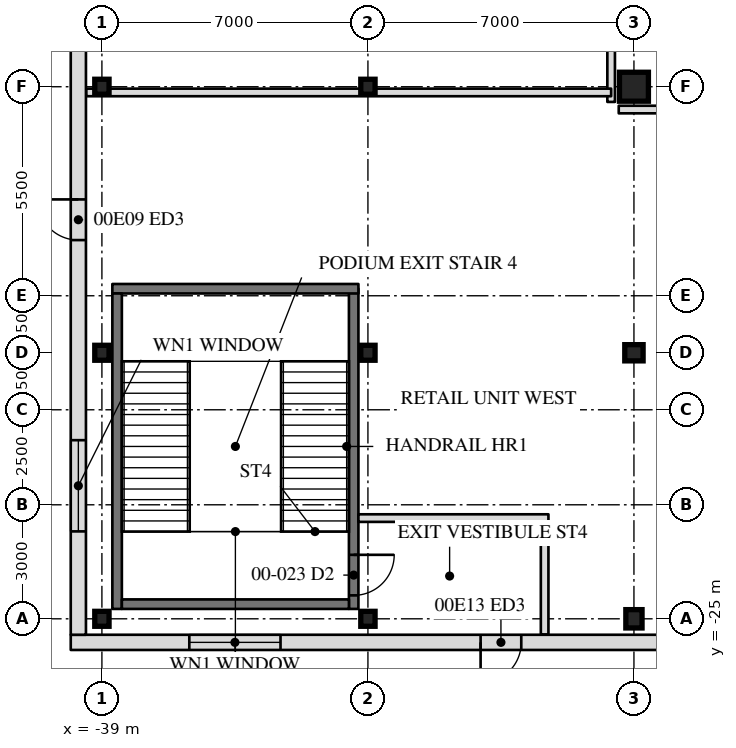
"""IFC4 building model, lengths in metres.
Left out: names, types, materials, properties, quantities, classifications, styles, units other than length and angle.
Written with IfcOpenShell. Run it as: python <this file> out.ifc"""

import sys

from ifc_helpers import new_model, si_unit, direction, frame, frame_2d, origin, origin_2d, place, context, subcontext, project, spatial, rectangle, hollow_rectangle, i_section, extrude, element, fill, save


model = new_model("IFC4")
c1 = context("Model", 3, precision=1e-05, world=origin(), true_north=direction((0.0, 1.0)))
c2 = subcontext(c1, "Body", "Model", "MODEL_VIEW")
j1 = project(units=[si_unit("LENGTHUNIT", "METRE"), si_unit("PLANEANGLEUNIT", "RADIAN")], contexts=[c1])
p1 = place(None, origin())
s1 = spatial("IfcSite", under=j1, at=p1, CompositionType="ELEMENT")
p2 = place(p1, origin())
s2 = spatial("IfcBuilding", under=s1, at=p2, CompositionType="ELEMENT")
p3 = place(p2, origin())
s3 = spatial("IfcBuildingStorey", under=s2, at=p3, CompositionType="ELEMENT", Elevation=0.0)
p4 = place(p3, frame((-25.0, -11.0, -0.3), z_axis=(0.0, 0.0, 1.0), x_axis=(0.0, 1.0, 0.0)))
e1 = element("IfcColumn", 1, at=p4, inside=s3, PredefinedType="COLUMN", context=c2, shape_type="SweptSolid", body=[
    extrude(hollow_rectangle(XDim=0.762, YDim=0.762, WallThickness=0.152, at=origin_2d()), origin(), (0.0, 0.0, 1.0), 6.3),
])
for number, where, z_axis, x_axis in (
    (2, (-25.0, -18.0, -0.3), (0.0, 0.0, 1.0), (0.0, 1.0, 0.0)),
    (3, (-25.0, -25.0, -0.3), (0.0, 0.0, 1.0), (1.0, 0.0, 0.0)),
):
    element("IfcColumn", number, at=place(p3, frame(where, z_axis=z_axis, x_axis=x_axis)), inside=s3, PredefinedType="COLUMN", context=c2, shape_type="SweptSolid", body=[
        extrude(i_section(OverallWidth=0.427, OverallDepth=0.483, WebThickness=0.051, FlangeThickness=0.082, at=origin_2d()), origin(), (0.0, 0.0, 1.0), 6.3),
    ])
for number, where, z_axis, x_axis in (
    (4, (-39.0, -25.0, -0.3), (0.0, 0.0, 1.0), (0.0, 1.0, 0.0)),
    (5, (-39.0, -18.0, -0.3), (0.0, 0.0, 1.0), (0.0, 1.0, 0.0)),
    (6, (-39.0, -11.0, -0.3), (0.0, 0.0, 1.0), (0.0, 1.0, 0.0)),
    (7, (-32.0, -25.0, -0.3), (0.0, 0.0, 1.0), (0.0, 1.0, 0.0)),
    (8, (-32.0, -18.0, -0.3), (0.0, 0.0, 1.0), (0.0, 1.0, 0.0)),
    (9, (-32.0, -11.0, -0.3), (0.0, 0.0, 1.0), (0.0, 1.0, 0.0)),
):
    element("IfcColumn", number, at=place(p3, frame(where, z_axis=z_axis, x_axis=x_axis)), inside=s3, PredefinedType="COLUMN", context=c2, shape_type="SweptSolid", body=[
        extrude(i_section(OverallWidth=0.394, OverallDepth=0.376, WebThickness=0.017, FlangeThickness=0.028, at=origin_2d()), origin(), (0.0, 0.0, 1.0), 6.3),
    ])
p5 = place(p3, frame((-39.82, -25.62, -0.3), z_axis=(0.0, 0.0, 1.0), x_axis=(1.0, 0.0, 0.0)))
e10 = element("IfcWall", 10, at=p5, inside=s3, PredefinedType="SOLIDWALL", context=c2, shape_type="SweptSolid", body=[
    extrude(rectangle(XDim=79.64, YDim=0.4, at=frame_2d((39.82, 0.0))), origin(), (0.0, 0.0, 1.0), 6.11),
])
p6 = place(p5, frame((3.12, 0.0, 1.2)))
e11 = element("IfcOpeningElement", 11, at=p6, cuts=e10, PredefinedType="OPENING", context=c2, shape_type="SweptSolid", body=[
    extrude(rectangle(XDim=2.4, YDim=4.2, at=frame_2d((1.2, 2.1))), frame((0.0, 0.21, 0.0), z_axis=(0.0, -1.0, 0.0), x_axis=(1.0, 0.0, 0.0)), (0.0, 0.0, 1.0), 0.42),
])
p7 = place(p5, frame((17.12, 0.0, 1.2)))
e12 = element("IfcOpeningElement", 12, at=p7, cuts=e10, PredefinedType="OPENING", context=c2, shape_type="SweptSolid", body=[
    extrude(rectangle(XDim=2.4, YDim=4.2, at=frame_2d((1.2, 2.1))), frame((0.0, 0.21, 0.0), z_axis=(0.0, -1.0, 0.0), x_axis=(1.0, 0.0, 0.0)), (0.0, 0.0, 1.0), 0.42),
])
p8 = place(p5, frame((24.12, 0.0, 1.2)))
e13 = element("IfcOpeningElement", 13, at=p8, cuts=e10, PredefinedType="OPENING", context=c2, shape_type="SweptSolid", body=[
    extrude(rectangle(XDim=2.4, YDim=4.2, at=frame_2d((1.2, 2.1))), frame((0.0, 0.21, 0.0), z_axis=(0.0, -1.0, 0.0), x_axis=(1.0, 0.0, 0.0)), (0.0, 0.0, 1.0), 0.42),
])
p9 = place(p5, frame((33.405, 0.0, 0.3)))
e14 = element("IfcOpeningElement", 14, at=p9, cuts=e10, PredefinedType="OPENING", context=c2, shape_type="SweptSolid", body=[
    extrude(rectangle(XDim=1.83, YDim=2.44, at=frame_2d((0.915, 1.22))), frame((0.0, 0.21, 0.0), z_axis=(0.0, -1.0, 0.0), x_axis=(1.0, 0.0, 0.0)), (0.0, 0.0, 1.0), 0.42),
])
p10 = place(p5, frame((44.405, 0.0, 0.3)))
e15 = element("IfcOpeningElement", 15, at=p10, cuts=e10, PredefinedType="OPENING", context=c2, shape_type="SweptSolid", body=[
    extrude(rectangle(XDim=1.83, YDim=2.44, at=frame_2d((0.915, 1.22))), frame((0.0, 0.21, 0.0), z_axis=(0.0, -1.0, 0.0), x_axis=(1.0, 0.0, 0.0)), (0.0, 0.0, 1.0), 0.42),
])
p11 = place(p5, frame((53.12, 0.0, 1.2)))
e16 = element("IfcOpeningElement", 16, at=p11, cuts=e10, PredefinedType="OPENING", context=c2, shape_type="SweptSolid", body=[
    extrude(rectangle(XDim=2.4, YDim=4.2, at=frame_2d((1.2, 2.1))), frame((0.0, 0.21, 0.0), z_axis=(0.0, -1.0, 0.0), x_axis=(1.0, 0.0, 0.0)), (0.0, 0.0, 1.0), 0.42),
])
p12 = place(p5, frame((60.12, 0.0, 1.2)))
e17 = element("IfcOpeningElement", 17, at=p12, cuts=e10, PredefinedType="OPENING", context=c2, shape_type="SweptSolid", body=[
    extrude(rectangle(XDim=2.4, YDim=4.2, at=frame_2d((1.2, 2.1))), frame((0.0, 0.21, 0.0), z_axis=(0.0, -1.0, 0.0), x_axis=(1.0, 0.0, 0.0)), (0.0, 0.0, 1.0), 0.42),
])
p13 = place(p5, frame((67.785, 0.0, 0.3)))
e18 = element("IfcOpeningElement", 18, at=p13, cuts=e10, PredefinedType="OPENING", context=c2, shape_type="SweptSolid", body=[
    extrude(rectangle(XDim=1.07, YDim=2.44, at=frame_2d((0.535, 1.22))), frame((0.0, 0.21, 0.0), z_axis=(0.0, -1.0, 0.0), x_axis=(1.0, 0.0, 0.0)), (0.0, 0.0, 1.0), 0.42),
])
p14 = place(p5, frame((74.12, 0.0, 1.2)))
e19 = element("IfcOpeningElement", 19, at=p14, cuts=e10, PredefinedType="OPENING", context=c2, shape_type="SweptSolid", body=[
    extrude(rectangle(XDim=2.4, YDim=4.2, at=frame_2d((1.2, 2.1))), frame((0.0, 0.21, 0.0), z_axis=(0.0, -1.0, 0.0), x_axis=(1.0, 0.0, 0.0)), (0.0, 0.0, 1.0), 0.42),
])
p15 = place(p5, frame((10.785, 0.0, 0.3)))
e20 = element("IfcOpeningElement", 20, at=p15, cuts=e10, PredefinedType="OPENING", context=c2, shape_type="SweptSolid", body=[
    extrude(rectangle(XDim=1.07, YDim=2.13, at=frame_2d((0.535, 1.065))), frame((0.0, 0.21, 0.0), z_axis=(0.0, -1.0, 0.0), x_axis=(1.0, 0.0, 0.0)), (0.0, 0.0, 1.0), 0.42),
])
p16 = place(p3, frame((-39.62, 25.42, -0.3), z_axis=(0.0, 0.0, 1.0), x_axis=(0.0, -1.0, 0.0)))
e21 = element("IfcWall", 21, at=p16, inside=s3, PredefinedType="SOLIDWALL", context=c2, shape_type="SweptSolid", body=[
    extrude(rectangle(XDim=50.84, YDim=0.4, at=frame_2d((25.42, 0.0))), origin(), (0.0, 0.0, 1.0), 6.11),
])
p17 = place(p16, frame((45.72, 0.0, 1.2)))
e22 = element("IfcOpeningElement", 22, at=p17, cuts=e21, PredefinedType="OPENING", context=c2, shape_type="SweptSolid", body=[
    extrude(rectangle(XDim=2.4, YDim=4.2, at=frame_2d((1.2, 2.1))), frame((0.0, 0.21, 0.0), z_axis=(0.0, -1.0, 0.0), x_axis=(1.0, 0.0, 0.0)), (0.0, 0.0, 1.0), 0.42),
])
p18 = place(p16, frame((39.385, 0.0, 0.3)))
e23 = element("IfcOpeningElement", 23, at=p18, cuts=e21, PredefinedType="OPENING", context=c2, shape_type="SweptSolid", body=[
    extrude(rectangle(XDim=1.07, YDim=2.13, at=frame_2d((0.535, 1.065))), frame((0.0, 0.21, 0.0), z_axis=(0.0, -1.0, 0.0), x_axis=(1.0, 0.0, 0.0)), (0.0, 0.0, 1.0), 0.42),
])
p19 = place(p16, frame((29.09, 0.0, 0.3)))
e24 = element("IfcOpeningElement", 24, at=p19, cuts=e21, PredefinedType="OPENING", context=c2, shape_type="SweptSolid", body=[
    extrude(rectangle(XDim=3.66, YDim=4.27, at=frame_2d((1.83, 2.135))), frame((0.0, 0.21, 0.0), z_axis=(0.0, -1.0, 0.0), x_axis=(1.0, 0.0, 0.0)), (0.0, 0.0, 1.0), 0.42),
])
p20 = place(p16, frame((18.09, 0.0, 0.3)))
e25 = element("IfcOpeningElement", 25, at=p20, cuts=e21, PredefinedType="OPENING", context=c2, shape_type="SweptSolid", body=[
    extrude(rectangle(XDim=3.66, YDim=4.27, at=frame_2d((1.83, 2.135))), frame((0.0, 0.21, 0.0), z_axis=(0.0, -1.0, 0.0), x_axis=(1.0, 0.0, 0.0)), (0.0, 0.0, 1.0), 0.42),
])
p21 = place(p16, frame((10.385, 0.0, 0.3)))
e26 = element("IfcOpeningElement", 26, at=p21, cuts=e21, PredefinedType="OPENING", context=c2, shape_type="SweptSolid", body=[
    extrude(rectangle(XDim=1.07, YDim=2.44, at=frame_2d((0.535, 1.22))), frame((0.0, 0.21, 0.0), z_axis=(0.0, -1.0, 0.0), x_axis=(1.0, 0.0, 0.0)), (0.0, 0.0, 1.0), 0.42),
])
p22 = place(p16, frame((2.72, 0.0, 1.2)))
e27 = element("IfcOpeningElement", 27, at=p22, cuts=e21, PredefinedType="OPENING", context=c2, shape_type="SweptSolid", body=[
    extrude(rectangle(XDim=2.4, YDim=4.2, at=frame_2d((1.2, 2.1))), frame((0.0, 0.21, 0.0), z_axis=(0.0, -1.0, 0.0), x_axis=(1.0, 0.0, 0.0)), (0.0, 0.0, 1.0), 0.42),
])
p23 = place(p3, frame((-32.375, -16.315, 0.0), z_axis=(0.0, 0.0, 1.0), x_axis=(0.0, -1.0, 0.0)))
e28 = element("IfcWall", 28, at=p23, inside=s3, PredefinedType="SOLIDWALL", context=c2, shape_type="SweptSolid", body=[
    extrude(rectangle(XDim=8.425, YDim=0.25, at=frame_2d((4.212, 0.0))), origin(), (0.0, 0.0, 1.0), 5.81),
])
p24 = place(p23, frame((7.001, 0.0, 0.3)))
e29 = element("IfcOpeningElement", 29, at=p24, cuts=e28, PredefinedType="OPENING", context=c2, shape_type="SweptSolid", body=[
    extrude(rectangle(XDim=1.067, YDim=2.134, at=frame_2d((0.533, 1.067))), frame((0.0, 0.135, 0.0), z_axis=(0.0, -1.0, 0.0), x_axis=(1.0, 0.0, 0.0)), (0.0, 0.0, 1.0), 0.27),
])
p25 = place(p3, frame((-32.25, -16.315, 0.0), z_axis=(0.0, 0.0, 1.0), x_axis=(-1.0, 0.0, 0.0)))
e30 = element("IfcWall", 30, at=p25, inside=s3, PredefinedType="SOLIDWALL", context=c2, shape_type="SweptSolid", body=[
    extrude(rectangle(XDim=6.475, YDim=0.25, at=frame_2d((3.238, 0.0))), origin(), (0.0, 0.0, 1.0), 5.81),
])
p26 = place(p3, frame((-38.6, -16.44, 0.0), z_axis=(0.0, 0.0, 1.0), x_axis=(0.0, -1.0, 0.0)))
e31 = element("IfcWall", 31, at=p26, inside=s3, PredefinedType="SOLIDWALL", context=c2, shape_type="SweptSolid", body=[
    extrude(rectangle(XDim=8.3, YDim=0.25, at=frame_2d((4.15, 0.0))), origin(), (0.0, 0.0, 1.0), 5.81),
])
p27 = place(p3, frame((-32.5, -24.615, 0.0), z_axis=(0.0, 0.0, 1.0), x_axis=(-1.0, 0.0, 0.0)))
e32 = element("IfcWall", 32, at=p27, inside=s3, PredefinedType="SOLIDWALL", context=c2, shape_type="SweptSolid", body=[
    extrude(rectangle(XDim=5.975, YDim=0.25, at=frame_2d((2.988, 0.0))), origin(), (0.0, 0.0, 1.0), 5.81),
])
p28 = place(p3, frame((-27.35, -22.45, 0.0), z_axis=(0.0, 0.0, 1.0), x_axis=(0.0, -1.0, 0.0)))
e33 = element("IfcWall", 33, at=p28, inside=s3, PredefinedType="PARTITIONING", context=c2, shape_type="SweptSolid", body=[
    extrude(rectangle(XDim=2.96, YDim=0.2, at=frame_2d((1.48, 0.0))), origin(), (0.0, 0.0, 1.0), 5.81),
])
p29 = place(p3, frame((-27.25, -22.35, 0.0), z_axis=(0.0, 0.0, 1.0), x_axis=(-1.0, 0.0, 0.0)))
e34 = element("IfcWall", 34, at=p29, inside=s3, PredefinedType="PARTITIONING", context=c2, shape_type="SweptSolid", body=[
    extrude(rectangle(XDim=5.0, YDim=0.2, at=frame_2d((2.5, 0.0))), origin(), (0.0, 0.0, 1.0), 5.81),
])
p30 = place(p3, frame((-25.6, 25.41, 0.0), z_axis=(0.0, 0.0, 1.0), x_axis=(0.0, -1.0, 0.0)))
e35 = element("IfcWall", 35, at=p30, inside=s3, PredefinedType="PARTITIONING", context=c2, shape_type="SweptSolid", body=[
    extrude(rectangle(XDim=36.81, YDim=0.2, at=frame_2d((18.405, 0.0))), origin(), (0.0, 0.0, 1.0), 5.81),
])
p31 = place(p30, frame((29.995, 0.0, 0.3)))
e36 = element("IfcOpeningElement", 36, at=p31, cuts=e35, PredefinedType="OPENING", context=c2, shape_type="SweptSolid", body=[
    extrude(rectangle(XDim=1.83, YDim=2.134, at=frame_2d((0.915, 1.067))), frame((0.0, 0.11, 0.0), z_axis=(0.0, -1.0, 0.0), x_axis=(1.0, 0.0, 0.0)), (0.0, 0.0, 1.0), 0.22),
])
p32 = place(p30, frame((18.995, 0.0, 0.3)))
e37 = element("IfcOpeningElement", 37, at=p32, cuts=e35, PredefinedType="OPENING", context=c2, shape_type="SweptSolid", body=[
    extrude(rectangle(XDim=1.83, YDim=2.134, at=frame_2d((0.915, 1.067))), frame((0.0, 0.11, 0.0), z_axis=(0.0, -1.0, 0.0), x_axis=(1.0, 0.0, 0.0)), (0.0, 0.0, 1.0), 0.22),
])
p33 = place(p3, frame((-25.4, -11.6, 0.0), z_axis=(0.0, 0.0, 1.0), x_axis=(1.0, 0.0, 0.0)))
e38 = element("IfcWall", 38, at=p33, inside=s3, PredefinedType="PARTITIONING", context=c2, shape_type="SweptSolid", body=[
    extrude(rectangle(XDim=7.3, YDim=0.2, at=frame_2d((3.65, 0.0))), origin(), (0.0, 0.0, 1.0), 5.81),
])
p34 = place(p3, frame((-25.6, -11.15, 0.0), z_axis=(0.0, 0.0, 1.0), x_axis=(-1.0, 0.0, 0.0)))
e39 = element("IfcWall", 39, at=p34, inside=s3, PredefinedType="PARTITIONING", context=c2, shape_type="SweptSolid", body=[
    extrude(rectangle(XDim=13.81, YDim=0.2, at=frame_2d((6.905, 0.0))), origin(), (0.0, 0.0, 1.0), 5.198),
])
p35 = place(p6, origin())
e40 = element("IfcWindow", 40, at=p35, inside=s3, PartitioningType="SINGLE_PANEL", PredefinedType="WINDOW", context=c2, shape_type="SweptSolid", body=[
    extrude(rectangle(XDim=2.4, YDim=4.2, at=frame_2d((1.2, 2.1))), frame((0.0, 0.03, 0.0), z_axis=(0.0, -1.0, 0.0), x_axis=(1.0, 0.0, 0.0)), (0.0, 0.0, 1.0), 0.06),
])
fill(e11, e40)
p36 = place(p17, origin())
e41 = element("IfcWindow", 41, at=p36, inside=s3, PartitioningType="SINGLE_PANEL", PredefinedType="WINDOW", context=c2, shape_type="SweptSolid", body=[
    extrude(rectangle(XDim=2.4, YDim=4.2, at=frame_2d((1.2, 2.1))), frame((0.0, 0.03, 0.0), z_axis=(0.0, -1.0, 0.0), x_axis=(1.0, 0.0, 0.0)), (0.0, 0.0, 1.0), 0.06),
])
fill(e22, e41)
p37 = place(p18, frame((1.07, 0.0, 0.0), z_axis=(0.0, 0.0, 1.0), x_axis=(-1.0, 0.0, 0.0)))
e42 = element("IfcDoor", 42, at=p37, inside=s3, OperationType="SINGLE_SWING_LEFT", PredefinedType="DOOR", context=c2, shape_type="SweptSolid", body=[
    extrude(rectangle(XDim=1.07, YDim=2.13, at=frame_2d((0.535, 1.065))), frame((0.0, 0.025, 0.0), z_axis=(0.0, -1.0, 0.0), x_axis=(1.0, 0.0, 0.0)), (0.0, 0.0, 1.0), 0.05),
])
fill(e23, e42)
p38 = place(p15, frame((1.07, 0.0, 0.0), z_axis=(0.0, 0.0, 1.0), x_axis=(-1.0, 0.0, 0.0)))
e43 = element("IfcDoor", 43, at=p38, inside=s3, OperationType="SINGLE_SWING_LEFT", PredefinedType="DOOR", context=c2, shape_type="SweptSolid", body=[
    extrude(rectangle(XDim=1.07, YDim=2.13, at=frame_2d((0.535, 1.065))), frame((0.0, 0.025, 0.0), z_axis=(0.0, -1.0, 0.0), x_axis=(1.0, 0.0, 0.0)), (0.0, 0.0, 1.0), 0.05),
])
fill(e20, e43)
p39 = place(p24, origin())
e44 = element("IfcDoor", 44, at=p39, inside=s3, OperationType="SINGLE_SWING_LEFT", PredefinedType="DOOR", context=c2, shape_type="SweptSolid", body=[
    extrude(rectangle(XDim=1.067, YDim=2.134, at=frame_2d((0.533, 1.067))), frame((0.0, 0.025, 0.0), z_axis=(0.0, -1.0, 0.0), x_axis=(1.0, 0.0, 0.0)), (0.0, 0.0, 1.0), 0.05),
])
fill(e29, e44)
save(model, sys.argv[1])
